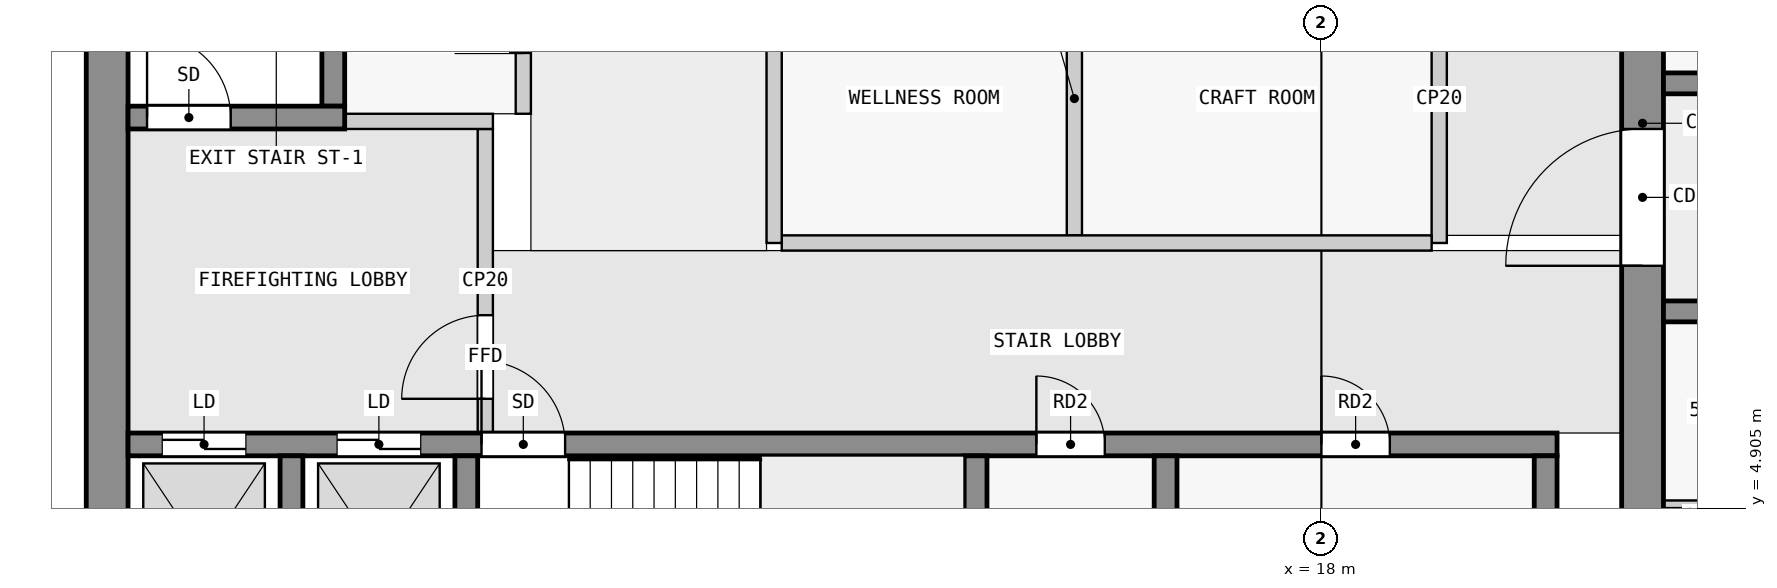
"""IFC4 building model, lengths in metres.
Left out: names, types, materials, properties, quantities, classifications, styles, units other than length and angle.
Written with IfcOpenShell. Run it as: python <this file> out.ifc"""

import sys

from ifc_helpers import new_model, si_unit, direction, frame, frame_2d, origin, place, context, subcontext, project, spatial, rectangle, extrude, element, fill, save


model = new_model("IFC4")
c1 = context("Model", 3, precision=1e-05, world=origin(), true_north=direction((0.0, 1.0)))
c2 = subcontext(c1, "Body", "Model", "MODEL_VIEW")
j1 = project(units=[si_unit("LENGTHUNIT", "METRE"), si_unit("PLANEANGLEUNIT", "RADIAN")], contexts=[c1])
p1 = place(None, origin())
s1 = spatial("IfcSite", under=j1, at=p1, CompositionType="ELEMENT")
p2 = place(p1, origin())
s2 = spatial("IfcBuilding", under=s1, at=p2, CompositionType="ELEMENT")
p3 = place(p2, frame((0.0, 0.0, 197.9)))
s3 = spatial("IfcBuildingStorey", under=s2, at=p3, CompositionType="ELEMENT", Elevation=197.9)
p4 = place(p3, frame((2.025, 2.5, 0.0), z_axis=(0.0, 0.0, 1.0), x_axis=(0.0, 1.0, 0.0)))
e1 = element("IfcWall", 1, at=p4, inside=s3, PredefinedType="SHEAR", context=c2, shape_type="SweptSolid", body=[
    extrude(rectangle(XDim=14.95, YDim=0.55, at=frame_2d((7.475, 0.0))), origin(), (0.0, 0.0, 1.0), 3.25),
])
p5 = place(p3, frame((22.225, 2.5, 0.0), z_axis=(0.0, 0.0, 1.0), x_axis=(0.0, 1.0, 0.0)))
e2 = element("IfcWall", 2, at=p5, inside=s3, PredefinedType="SHEAR", context=c2, shape_type="SweptSolid", body=[
    extrude(rectangle(XDim=14.95, YDim=0.55, at=frame_2d((7.475, 0.0))), origin(), (0.0, 0.0, 1.0), 3.25),
])
p6 = place(p5, frame((5.6, 0.0, 0.0)))
e3 = element("IfcOpeningElement", 3, at=p6, cuts=e2, PredefinedType="OPENING", context=c2, shape_type="SweptSolid", body=[
    extrude(rectangle(XDim=1.8, YDim=2.1, at=frame_2d((0.9, 1.05))), frame((0.0, 0.285, 0.0), z_axis=(0.0, -1.0, 0.0), x_axis=(1.0, 0.0, 0.0)), (0.0, 0.0, 1.0), 0.57),
])
for number, where, z_axis, x_axis in (
    (4, (4.45, 2.8, 0.0), (0.0, 0.0, 1.0), (0.0, 1.0, 0.0)),
    (5, (6.75, 2.8, 0.0), (0.0, 0.0, 1.0), (0.0, 1.0, 0.0)),
    (6, (13.45, 2.8, 0.0), (0.0, 0.0, 1.0), (0.0, 1.0, 0.0)),
    (7, (15.95, 2.8, 0.0), (0.0, 0.0, 1.0), (0.0, 1.0, 0.0)),
    (8, (20.95, 2.8, 0.0), (0.0, 0.0, 1.0), (0.0, 1.0, 0.0)),
):
    element("IfcWall", number, at=place(p3, frame(where, z_axis=z_axis, x_axis=x_axis)), inside=s3, PredefinedType="SHEAR", context=c2, shape_type="SweptSolid", body=[
        extrude(rectangle(XDim=2.8, YDim=0.3, at=frame_2d((1.4, 0.0))), origin(), (0.0, 0.0, 1.0), 3.25),
    ])
p7 = place(p3, frame((2.3, 5.75, 0.0), z_axis=(0.0, 0.0, 1.0), x_axis=(1.0, 0.0, 0.0)))
e9 = element("IfcWall", 9, at=p7, inside=s3, PredefinedType="SHEAR", context=c2, shape_type="SweptSolid", body=[
    extrude(rectangle(XDim=18.8, YDim=0.3, at=frame_2d((9.4, 0.0))), origin(), (0.0, 0.0, 1.0), 3.25),
])
p8 = place(p7, frame((4.65, 0.0, 0.0)))
e10 = element("IfcOpeningElement", 10, at=p8, cuts=e9, PredefinedType="OPENING", context=c2, shape_type="SweptSolid", body=[
    extrude(rectangle(XDim=1.1, YDim=2.1, at=frame_2d((0.55, 1.05))), frame((0.0, 0.16, 0.0), z_axis=(0.0, -1.0, 0.0), x_axis=(1.0, 0.0, 0.0)), (0.0, 0.0, 1.0), 0.32),
])
p9 = place(p7, frame((0.45, 0.0, 0.0)))
e11 = element("IfcOpeningElement", 11, at=p9, cuts=e9, PredefinedType="OPENING", context=c2, shape_type="SweptSolid", body=[
    extrude(rectangle(XDim=1.1, YDim=2.1, at=frame_2d((0.55, 1.05))), frame((0.0, 0.16, 0.0), z_axis=(0.0, -1.0, 0.0), x_axis=(1.0, 0.0, 0.0)), (0.0, 0.0, 1.0), 0.32),
])
p10 = place(p7, frame((2.75, 0.0, 0.0)))
e12 = element("IfcOpeningElement", 12, at=p10, cuts=e9, PredefinedType="OPENING", context=c2, shape_type="SweptSolid", body=[
    extrude(rectangle(XDim=1.1, YDim=2.1, at=frame_2d((0.55, 1.05))), frame((0.0, 0.16, 0.0), z_axis=(0.0, -1.0, 0.0), x_axis=(1.0, 0.0, 0.0)), (0.0, 0.0, 1.0), 0.32),
])
p11 = place(p7, frame((11.95, 0.0, 0.0)))
e13 = element("IfcOpeningElement", 13, at=p11, cuts=e9, PredefinedType="OPENING", context=c2, shape_type="SweptSolid", body=[
    extrude(rectangle(XDim=0.9, YDim=2.1, at=frame_2d((0.45, 1.05))), frame((0.0, 0.16, 0.0), z_axis=(0.0, -1.0, 0.0), x_axis=(1.0, 0.0, 0.0)), (0.0, 0.0, 1.0), 0.32),
])
p12 = place(p7, frame((15.7, 0.0, 0.0)))
e14 = element("IfcOpeningElement", 14, at=p12, cuts=e9, PredefinedType="OPENING", context=c2, shape_type="SweptSolid", body=[
    extrude(rectangle(XDim=0.9, YDim=2.1, at=frame_2d((0.45, 1.05))), frame((0.0, 0.16, 0.0), z_axis=(0.0, -1.0, 0.0), x_axis=(1.0, 0.0, 0.0)), (0.0, 0.0, 1.0), 0.32),
])
p13 = place(p3, frame((2.3, 10.05, 0.0), z_axis=(0.0, 0.0, 1.0), x_axis=(1.0, 0.0, 0.0)))
e15 = element("IfcWall", 15, at=p13, inside=s3, PredefinedType="SHEAR", context=c2, shape_type="SweptSolid", body=[
    extrude(rectangle(XDim=2.85, YDim=0.3, at=frame_2d((1.425, 0.0))), origin(), (0.0, 0.0, 1.0), 3.25),
])
p14 = place(p13, frame((0.25, 0.0, 0.0)))
e16 = element("IfcOpeningElement", 16, at=p14, cuts=e15, PredefinedType="OPENING", context=c2, shape_type="SweptSolid", body=[
    extrude(rectangle(XDim=1.1, YDim=2.1, at=frame_2d((0.55, 1.05))), frame((0.0, 0.16, 0.0), z_axis=(0.0, -1.0, 0.0), x_axis=(1.0, 0.0, 0.0)), (0.0, 0.0, 1.0), 0.32),
])
p15 = place(p3, frame((5.0, 10.2, 0.0), z_axis=(0.0, 0.0, 1.0), x_axis=(0.0, 1.0, 0.0)))
e17 = element("IfcWall", 17, at=p15, inside=s3, PredefinedType="SHEAR", context=c2, shape_type="SweptSolid", body=[
    extrude(rectangle(XDim=6.4, YDim=0.3, at=frame_2d((3.2, 0.0))), origin(), (0.0, 0.0, 1.0), 3.25),
])
p16 = place(p3, frame((22.5, 7.5, 0.0), z_axis=(0.0, 0.0, 1.0), x_axis=(1.0, 0.0, 0.0)))
e18 = element("IfcWall", 18, at=p16, inside=s3, PredefinedType="SHEAR", context=c2, shape_type="SweptSolid", body=[
    extrude(rectangle(XDim=22.5, YDim=0.275, at=frame_2d((11.25, 0.0))), origin(), (0.0, 0.0, 1.0), 3.25),
])
p17 = place(p16, frame((1.75, 0.0, 0.0)))
e19 = element("IfcOpeningElement", 19, at=p17, cuts=e18, PredefinedType="OPENING", context=c2, shape_type="SweptSolid", body=[
    extrude(rectangle(XDim=1.0, YDim=2.1, at=frame_2d((0.5, 1.05))), frame((0.0, 0.147, 0.0), z_axis=(0.0, -1.0, 0.0), x_axis=(1.0, 0.0, 0.0)), (0.0, 0.0, 1.0), 0.295),
])
p18 = place(p16, frame((5.85, 0.0, 0.0)))
e20 = element("IfcOpeningElement", 20, at=p18, cuts=e18, PredefinedType="OPENING", context=c2, shape_type="SweptSolid", body=[
    extrude(rectangle(XDim=1.8, YDim=2.1, at=frame_2d((0.9, 1.05))), frame((0.0, 0.147, 0.0), z_axis=(0.0, -1.0, 0.0), x_axis=(1.0, 0.0, 0.0)), (0.0, 0.0, 1.0), 0.295),
])
p19 = place(p16, frame((10.75, 0.0, 0.0)))
e21 = element("IfcOpeningElement", 21, at=p19, cuts=e18, PredefinedType="OPENING", context=c2, shape_type="SweptSolid", body=[
    extrude(rectangle(XDim=1.0, YDim=2.1, at=frame_2d((0.5, 1.05))), frame((0.0, 0.147, 0.0), z_axis=(0.0, -1.0, 0.0), x_axis=(1.0, 0.0, 0.0)), (0.0, 0.0, 1.0), 0.295),
])
p20 = place(p16, frame((16.85, 0.0, 0.0)))
e22 = element("IfcOpeningElement", 22, at=p20, cuts=e18, PredefinedType="OPENING", context=c2, shape_type="SweptSolid", body=[
    extrude(rectangle(XDim=1.0, YDim=2.1, at=frame_2d((0.5, 1.05))), frame((0.0, 0.147, 0.0), z_axis=(0.0, -1.0, 0.0), x_axis=(1.0, 0.0, 0.0)), (0.0, 0.0, 1.0), 0.295),
])
p21 = place(p3, frame((22.5, 10.5, 0.0), z_axis=(0.0, 0.0, 1.0), x_axis=(1.0, 0.0, 0.0)))
e23 = element("IfcWall", 23, at=p21, inside=s3, PredefinedType="SHEAR", context=c2, shape_type="SweptSolid", body=[
    extrude(rectangle(XDim=22.5, YDim=0.275, at=frame_2d((11.25, 0.0))), origin(), (0.0, 0.0, 1.0), 3.25),
])
p22 = place(p21, frame((1.75, 0.0, 0.0)))
e24 = element("IfcOpeningElement", 24, at=p22, cuts=e23, PredefinedType="OPENING", context=c2, shape_type="SweptSolid", body=[
    extrude(rectangle(XDim=1.0, YDim=2.1, at=frame_2d((0.5, 1.05))), frame((0.0, 0.147, 0.0), z_axis=(0.0, -1.0, 0.0), x_axis=(1.0, 0.0, 0.0)), (0.0, 0.0, 1.0), 0.295),
])
p23 = place(p21, frame((6.25, 0.0, 0.0)))
e25 = element("IfcOpeningElement", 25, at=p23, cuts=e23, PredefinedType="OPENING", context=c2, shape_type="SweptSolid", body=[
    extrude(rectangle(XDim=1.0, YDim=2.1, at=frame_2d((0.5, 1.05))), frame((0.0, 0.147, 0.0), z_axis=(0.0, -1.0, 0.0), x_axis=(1.0, 0.0, 0.0)), (0.0, 0.0, 1.0), 0.295),
])
p24 = place(p21, frame((10.75, 0.0, 0.0)))
e26 = element("IfcOpeningElement", 26, at=p24, cuts=e23, PredefinedType="OPENING", context=c2, shape_type="SweptSolid", body=[
    extrude(rectangle(XDim=1.0, YDim=2.1, at=frame_2d((0.5, 1.05))), frame((0.0, 0.147, 0.0), z_axis=(0.0, -1.0, 0.0), x_axis=(1.0, 0.0, 0.0)), (0.0, 0.0, 1.0), 0.295),
])
p25 = place(p21, frame((15.25, 0.0, 0.0)))
e27 = element("IfcOpeningElement", 27, at=p25, cuts=e23, PredefinedType="OPENING", context=c2, shape_type="SweptSolid", body=[
    extrude(rectangle(XDim=1.0, YDim=2.1, at=frame_2d((0.5, 1.05))), frame((0.0, 0.147, 0.0), z_axis=(0.0, -1.0, 0.0), x_axis=(1.0, 0.0, 0.0)), (0.0, 0.0, 1.0), 0.295),
])
p26 = place(p21, frame((18.75, 0.0, 0.0)))
e28 = element("IfcOpeningElement", 28, at=p26, cuts=e23, PredefinedType="OPENING", context=c2, shape_type="SweptSolid", body=[
    extrude(rectangle(XDim=0.9, YDim=2.1, at=frame_2d((0.45, 1.05))), frame((0.0, 0.147, 0.0), z_axis=(0.0, -1.0, 0.0), x_axis=(1.0, 0.0, 0.0)), (0.0, 0.0, 1.0), 0.295),
])
p27 = place(p21, frame((20.95, 0.0, 0.0)))
e29 = element("IfcOpeningElement", 29, at=p27, cuts=e23, PredefinedType="OPENING", context=c2, shape_type="SweptSolid", body=[
    extrude(rectangle(XDim=1.0, YDim=2.1, at=frame_2d((0.5, 1.05))), frame((0.0, 0.147, 0.0), z_axis=(0.0, -1.0, 0.0), x_axis=(1.0, 0.0, 0.0)), (0.0, 0.0, 1.0), 0.295),
])
p28 = place(p3, frame((7.0, 5.9, 0.0), z_axis=(0.0, 0.0, 1.0), x_axis=(0.0, 1.0, 0.0)))
e30 = element("IfcWall", 30, at=p28, inside=s3, PredefinedType="PARTITIONING", context=c2, shape_type="SweptSolid", body=[
    extrude(rectangle(XDim=4.0, YDim=0.2, at=frame_2d((2.0, 0.0))), origin(), (0.0, 0.0, 1.0), 3.25),
])
p29 = place(p28, frame((0.45, 0.0, 0.0)))
e31 = element("IfcOpeningElement", 31, at=p29, cuts=e30, PredefinedType="OPENING", context=c2, shape_type="SweptSolid", body=[
    extrude(rectangle(XDim=1.1, YDim=2.1, at=frame_2d((0.55, 1.05))), frame((0.0, 0.11, 0.0), z_axis=(0.0, -1.0, 0.0), x_axis=(1.0, 0.0, 0.0)), (0.0, 0.0, 1.0), 0.22),
])
p30 = place(p3, frame((5.15, 10.0, 0.0), z_axis=(0.0, 0.0, 1.0), x_axis=(1.0, 0.0, 0.0)))
e32 = element("IfcWall", 32, at=p30, inside=s3, PredefinedType="PARTITIONING", context=c2, shape_type="SweptSolid", body=[
    extrude(rectangle(XDim=1.95, YDim=0.2, at=frame_2d((0.975, 0.0))), origin(), (0.0, 0.0, 1.0), 3.25),
])
p31 = place(p3, frame((10.8, 8.4, 0.0), z_axis=(0.0, 0.0, 1.0), x_axis=(0.0, 1.0, 0.0)))
e33 = element("IfcWall", 33, at=p31, inside=s3, PredefinedType="PARTITIONING", context=c2, shape_type="SweptSolid", body=[
    extrude(rectangle(XDim=3.8, YDim=0.2, at=frame_2d((1.9, 0.0))), origin(), (0.0, 0.0, 1.0), 3.25),
])
p32 = place(p3, frame((10.9, 8.4, 0.0), z_axis=(0.0, 0.0, 1.0), x_axis=(1.0, 0.0, 0.0)))
e34 = element("IfcWall", 34, at=p32, inside=s3, PredefinedType="PARTITIONING", context=c2, shape_type="SweptSolid", body=[
    extrude(rectangle(XDim=8.55, YDim=0.2, at=frame_2d((4.275, 0.0))), origin(), (0.0, 0.0, 1.0), 3.25),
])
p33 = place(p3, frame((19.55, 8.4, 0.0), z_axis=(0.0, 0.0, 1.0), x_axis=(0.0, 1.0, 0.0)))
e35 = element("IfcWall", 35, at=p33, inside=s3, PredefinedType="PARTITIONING", context=c2, shape_type="SweptSolid", body=[
    extrude(rectangle(XDim=3.8, YDim=0.2, at=frame_2d((1.9, 0.0))), origin(), (0.0, 0.0, 1.0), 3.25),
])
p34 = place(p3, frame((14.75, 8.5, 0.0), z_axis=(0.0, 0.0, 1.0), x_axis=(0.0, 1.0, 0.0)))
e36 = element("IfcWall", 36, at=p34, inside=s3, PredefinedType="PARTITIONING", context=c2, shape_type="SweptSolid", body=[
    extrude(rectangle(XDim=3.6, YDim=0.2, at=frame_2d((1.8, 0.0))), origin(), (0.0, 0.0, 1.0), 3.25),
])
p35 = place(p3, frame((7.5, 10.1, 0.0), z_axis=(0.0, 0.0, 1.0), x_axis=(0.0, 1.0, 0.0)))
e37 = element("IfcWall", 37, at=p35, inside=s3, PredefinedType="PARTITIONING", context=c2, shape_type="SweptSolid", body=[
    extrude(rectangle(XDim=7.35, YDim=0.2, at=frame_2d((3.675, 0.0))), origin(), (0.0, 0.0, 1.0), 3.25),
])
p36 = place(p35, frame((0.8, 0.0, 0.0)))
e38 = element("IfcOpeningElement", 38, at=p36, cuts=e37, PredefinedType="OPENING", context=c2, shape_type="SweptSolid", body=[
    extrude(rectangle(XDim=0.9, YDim=2.1, at=frame_2d((0.45, 1.05))), frame((0.0, 0.11, 0.0), z_axis=(0.0, -1.0, 0.0), x_axis=(1.0, 0.0, 0.0)), (0.0, 0.0, 1.0), 0.22),
])
p37 = place(p35, frame((3.3, 0.0, 0.0)))
e39 = element("IfcOpeningElement", 39, at=p37, cuts=e37, PredefinedType="OPENING", context=c2, shape_type="SweptSolid", body=[
    extrude(rectangle(XDim=0.9, YDim=2.1, at=frame_2d((0.45, 1.05))), frame((0.0, 0.11, 0.0), z_axis=(0.0, -1.0, 0.0), x_axis=(1.0, 0.0, 0.0)), (0.0, 0.0, 1.0), 0.22),
])
p38 = place(p35, frame((5.25, 0.0, 0.0)))
e40 = element("IfcOpeningElement", 40, at=p38, cuts=e37, PredefinedType="OPENING", context=c2, shape_type="SweptSolid", body=[
    extrude(rectangle(XDim=0.9, YDim=2.1, at=frame_2d((0.45, 1.05))), frame((0.0, 0.11, 0.0), z_axis=(0.0, -1.0, 0.0), x_axis=(1.0, 0.0, 0.0)), (0.0, 0.0, 1.0), 0.22),
])
p39 = place(p3, frame((22.5, 4.962, 0.0), z_axis=(0.0, 0.0, 1.0), x_axis=(1.0, 0.0, 0.0)))
e41 = element("IfcWall", 41, at=p39, inside=s3, PredefinedType="PARTITIONING", context=c2, shape_type="SweptSolid", body=[
    extrude(rectangle(XDim=1.45, YDim=0.1, at=frame_2d((0.725, 0.0))), origin(), (0.0, 0.0, 1.0), 3.25),
])
p40 = place(p29, origin())
e42 = element("IfcDoor", 42, at=p40, inside=s3, OperationType="SINGLE_SWING_LEFT", PredefinedType="DOOR", context=c2, shape_type="SweptSolid", body=[
    extrude(rectangle(XDim=1.1, YDim=2.1, at=frame_2d((0.55, 1.05))), frame((0.0, 0.025, 0.0), z_axis=(0.0, -1.0, 0.0), x_axis=(1.0, 0.0, 0.0)), (0.0, 0.0, 1.0), 0.05),
])
fill(e31, e42)
p41 = place(p14, origin())
e43 = element("IfcDoor", 43, at=p41, inside=s3, OperationType="SINGLE_SWING_RIGHT", PredefinedType="DOOR", context=c2, shape_type="SweptSolid", body=[
    extrude(rectangle(XDim=1.1, YDim=2.1, at=frame_2d((0.55, 1.05))), frame((0.0, 0.025, 0.0), z_axis=(0.0, -1.0, 0.0), x_axis=(1.0, 0.0, 0.0)), (0.0, 0.0, 1.0), 0.05),
])
fill(e16, e43)
p42 = place(p8, origin())
e44 = element("IfcDoor", 44, at=p42, inside=s3, OperationType="SINGLE_SWING_LEFT", PredefinedType="DOOR", context=c2, shape_type="SweptSolid", body=[
    extrude(rectangle(XDim=1.1, YDim=2.1, at=frame_2d((0.55, 1.05))), frame((0.0, 0.025, 0.0), z_axis=(0.0, -1.0, 0.0), x_axis=(1.0, 0.0, 0.0)), (0.0, 0.0, 1.0), 0.05),
])
fill(e10, e44)
p43 = place(p9, origin())
e45 = element("IfcDoor", 45, at=p43, inside=s3, OperationType="DOUBLE_DOOR_SLIDING", PredefinedType="DOOR", context=c2, shape_type="SweptSolid", body=[
    extrude(rectangle(XDim=1.1, YDim=2.1, at=frame_2d((0.55, 1.05))), frame((0.0, 0.025, 0.0), z_axis=(0.0, -1.0, 0.0), x_axis=(1.0, 0.0, 0.0)), (0.0, 0.0, 1.0), 0.05),
])
fill(e11, e45)
p44 = place(p10, origin())
e46 = element("IfcDoor", 46, at=p44, inside=s3, OperationType="DOUBLE_DOOR_SLIDING", PredefinedType="DOOR", context=c2, shape_type="SweptSolid", body=[
    extrude(rectangle(XDim=1.1, YDim=2.1, at=frame_2d((0.55, 1.05))), frame((0.0, 0.025, 0.0), z_axis=(0.0, -1.0, 0.0), x_axis=(1.0, 0.0, 0.0)), (0.0, 0.0, 1.0), 0.05),
])
fill(e12, e46)
p45 = place(p6, origin())
e47 = element("IfcDoor", 47, at=p45, inside=s3, OperationType="DOUBLE_DOOR_SINGLE_SWING", PredefinedType="DOOR", context=c2, shape_type="SweptSolid", body=[
    extrude(rectangle(XDim=1.8, YDim=2.1, at=frame_2d((0.9, 1.05))), frame((0.0, 0.025, 0.0), z_axis=(0.0, -1.0, 0.0), x_axis=(1.0, 0.0, 0.0)), (0.0, 0.0, 1.0), 0.05),
])
fill(e3, e47)
p46 = place(p11, origin())
e48 = element("IfcDoor", 48, at=p46, inside=s3, OperationType="SINGLE_SWING_LEFT", PredefinedType="DOOR", context=c2, shape_type="SweptSolid", body=[
    extrude(rectangle(XDim=0.9, YDim=2.1, at=frame_2d((0.45, 1.05))), frame((0.0, 0.025, 0.0), z_axis=(0.0, -1.0, 0.0), x_axis=(1.0, 0.0, 0.0)), (0.0, 0.0, 1.0), 0.05),
])
fill(e13, e48)
p47 = place(p12, origin())
e49 = element("IfcDoor", 49, at=p47, inside=s3, OperationType="SINGLE_SWING_LEFT", PredefinedType="DOOR", context=c2, shape_type="SweptSolid", body=[
    extrude(rectangle(XDim=0.9, YDim=2.1, at=frame_2d((0.45, 1.05))), frame((0.0, 0.025, 0.0), z_axis=(0.0, -1.0, 0.0), x_axis=(1.0, 0.0, 0.0)), (0.0, 0.0, 1.0), 0.05),
])
fill(e14, e49)
save(model, sys.argv[1])
